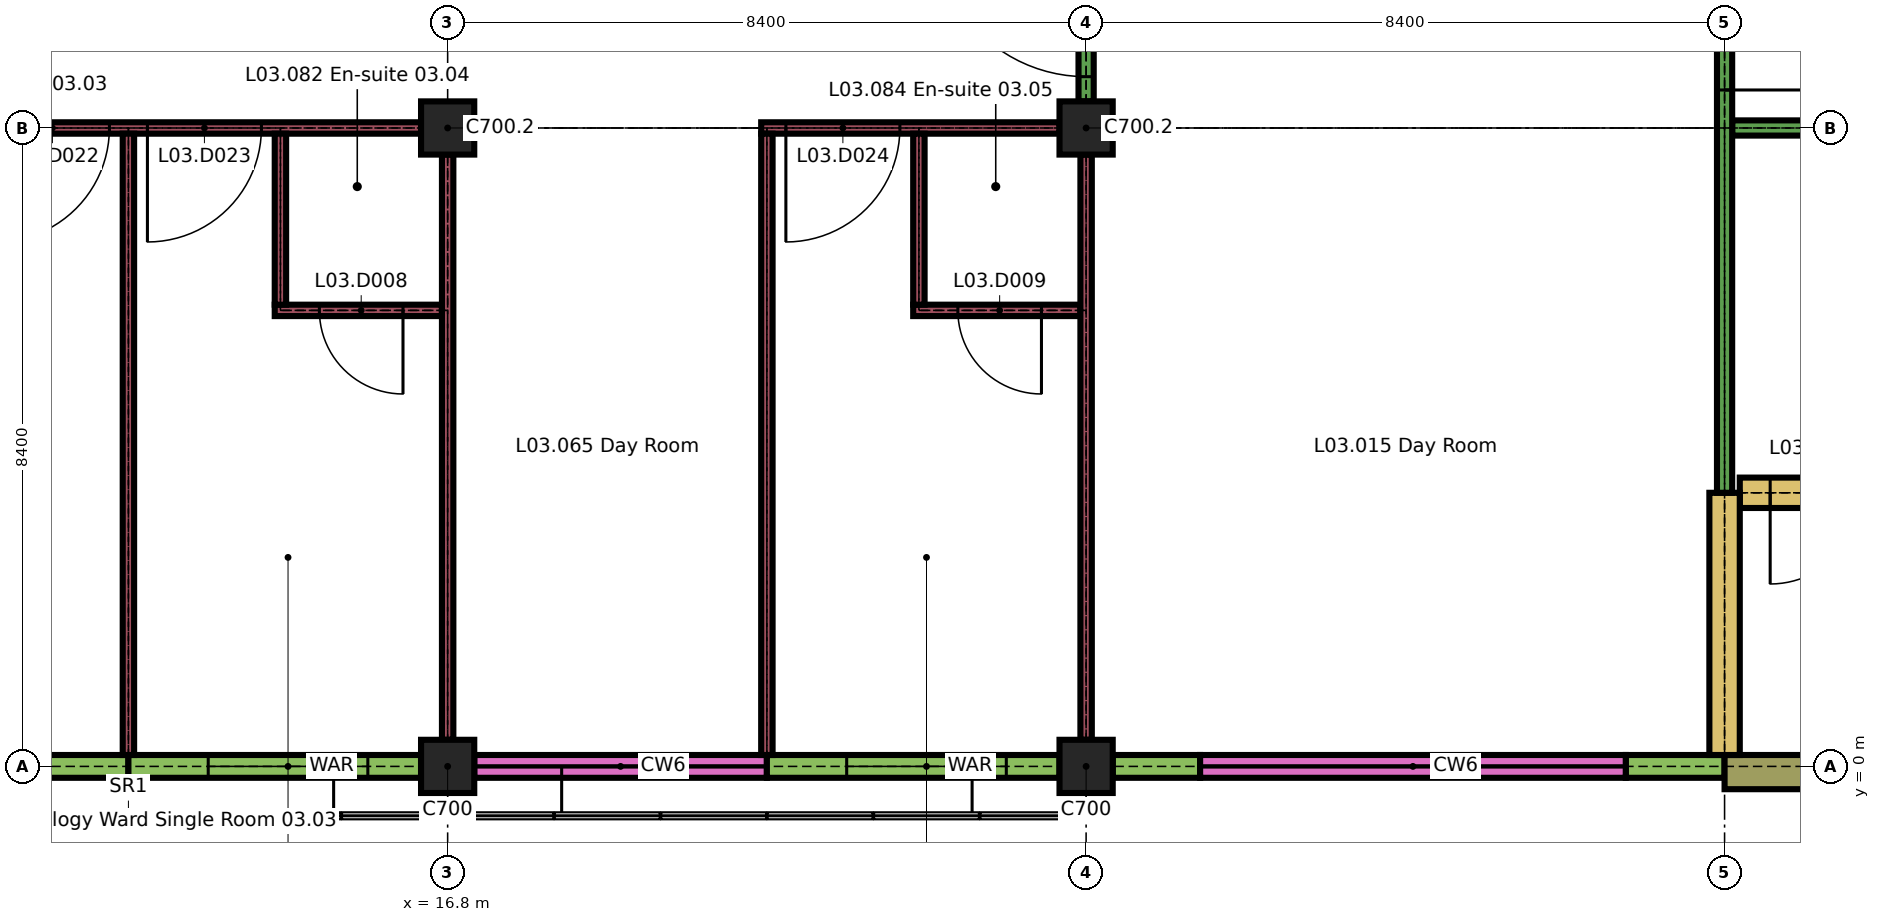
"""IFC4 building model, lengths in metres.
Left out: names, types, materials, properties, quantities, classifications, styles, units other than length and angle.
Written with IfcOpenShell. Run it as: python <this file> out.ifc"""

import sys

from ifc_helpers import new_model, si_unit, direction, frame, frame_2d, origin, origin_2d, place, context, subcontext, project, spatial, rectangle, extrude, element, fill, save


model = new_model("IFC4")
c1 = context("Model", 3, precision=1e-05, world=origin(), true_north=direction((0.0, 1.0)))
c2 = subcontext(c1, "Body", "Model", "MODEL_VIEW")
j1 = project(units=[si_unit("LENGTHUNIT", "METRE"), si_unit("PLANEANGLEUNIT", "RADIAN")], contexts=[c1])
p1 = place(None, origin())
s1 = spatial("IfcSite", under=j1, at=p1, CompositionType="ELEMENT")
p2 = place(p1, origin())
s2 = spatial("IfcBuilding", under=s1, at=p2, CompositionType="ELEMENT")
p3 = place(p2, frame((0.0, 0.0, 15.3)))
s3 = spatial("IfcBuildingStorey", under=s2, at=p3, CompositionType="ELEMENT", Elevation=15.3)
for number, where, z_axis, x_axis in (
    (1, (16.8, 0.0, 0.0), (0.0, 0.0, 1.0), (1.0, 0.0, 0.0)),
    (2, (25.2, 0.0, 0.0), (0.0, 0.0, 1.0), (1.0, 0.0, 0.0)),
    (3, (16.8, 8.4, 0.0), (0.0, 0.0, 1.0), (1.0, 0.0, 0.0)),
    (4, (25.2, 8.4, 0.0), (0.0, 0.0, 1.0), (1.0, 0.0, 0.0)),
):
    element("IfcColumn", number, at=place(p3, frame(where, z_axis=z_axis, x_axis=x_axis)), inside=s3, PredefinedType="COLUMN", context=c2, shape_type="SweptSolid", body=[
        extrude(rectangle(XDim=0.7, YDim=0.7, at=origin_2d()), origin(), (0.0, 0.0, 1.0), 3.26),
    ])
p4 = place(p3, frame((8.75, 0.0, 0.0), z_axis=(0.0, 0.0, 1.0), x_axis=(1.0, 0.0, 0.0)))
e5 = element("IfcWall", 5, at=p4, inside=s3, PredefinedType="SOLIDWALL", context=c2, shape_type="SweptSolid", body=[
    extrude(rectangle(XDim=3.85, YDim=0.3, at=frame_2d((1.925, 0.0))), origin(), (0.0, 0.0, 1.0), 2.96),
])
p5 = place(p4, frame((0.7, 0.0, 0.9)))
e6 = element("IfcOpeningElement", 6, at=p5, cuts=e5, PredefinedType="OPENING", context=c2, shape_type="SweptSolid", body=[
    extrude(rectangle(XDim=2.1, YDim=1.5, at=frame_2d((1.05, 0.75))), frame((0.0, 0.16, 0.0), z_axis=(0.0, -1.0, 0.0), x_axis=(1.0, 0.0, 0.0)), (0.0, 0.0, 1.0), 0.32),
])
p6 = place(p3, frame((12.6, 0.0, 0.0), z_axis=(0.0, 0.0, 1.0), x_axis=(1.0, 0.0, 0.0)))
e7 = element("IfcWall", 7, at=p6, inside=s3, PredefinedType="SOLIDWALL", context=c2, shape_type="SweptSolid", body=[
    extrude(rectangle(XDim=3.85, YDim=0.3, at=frame_2d((1.925, 0.0))), origin(), (0.0, 0.0, 1.0), 2.96),
])
p7 = place(p6, frame((1.05, 0.0, 0.9)))
e8 = element("IfcOpeningElement", 8, at=p7, cuts=e7, PredefinedType="OPENING", context=c2, shape_type="SweptSolid", body=[
    extrude(rectangle(XDim=2.1, YDim=1.5, at=frame_2d((1.05, 0.75))), frame((0.0, 0.16, 0.0), z_axis=(0.0, -1.0, 0.0), x_axis=(1.0, 0.0, 0.0)), (0.0, 0.0, 1.0), 0.32),
])
p8 = place(p3, frame((17.15, 0.0, 0.0), z_axis=(0.0, 0.0, 1.0), x_axis=(1.0, 0.0, 0.0)))
e9 = element("IfcWall", 9, at=p8, inside=s3, PredefinedType="SOLIDWALL", context=c2, shape_type="SweptSolid", body=[
    extrude(rectangle(XDim=3.85, YDim=0.3, at=frame_2d((1.925, 0.0))), origin(), (0.0, 0.0, 1.0), 0.6),
])
p9 = place(p3, frame((21.0, 0.0, 0.0), z_axis=(0.0, 0.0, 1.0), x_axis=(1.0, 0.0, 0.0)))
e10 = element("IfcWall", 10, at=p9, inside=s3, PredefinedType="SOLIDWALL", context=c2, shape_type="SweptSolid", body=[
    extrude(rectangle(XDim=3.85, YDim=0.3, at=frame_2d((1.925, 0.0))), origin(), (0.0, 0.0, 1.0), 2.96),
])
p10 = place(p9, frame((1.05, 0.0, 0.9)))
e11 = element("IfcOpeningElement", 11, at=p10, cuts=e10, PredefinedType="OPENING", context=c2, shape_type="SweptSolid", body=[
    extrude(rectangle(XDim=2.1, YDim=1.5, at=frame_2d((1.05, 0.75))), frame((0.0, 0.16, 0.0), z_axis=(0.0, -1.0, 0.0), x_axis=(1.0, 0.0, 0.0)), (0.0, 0.0, 1.0), 0.32),
])
p11 = place(p3, frame((25.55, 0.0, 0.0), z_axis=(0.0, 0.0, 1.0), x_axis=(1.0, 0.0, 0.0)))
e12 = element("IfcWall", 12, at=p11, inside=s3, PredefinedType="SOLIDWALL", context=c2, shape_type="SweptSolid", body=[
    extrude(rectangle(XDim=1.15, YDim=0.3, at=frame_2d((0.575, 0.0))), origin(), (0.0, 0.0, 1.0), 2.96),
])
p12 = place(p3, frame((32.3, 0.0, 0.0), z_axis=(0.0, 0.0, 1.0), x_axis=(1.0, 0.0, 0.0)))
e13 = element("IfcWall", 13, at=p12, inside=s3, PredefinedType="SOLIDWALL", context=c2, shape_type="SweptSolid", body=[
    extrude(rectangle(XDim=1.3, YDim=0.3, at=frame_2d((0.65, 0.0))), origin(), (0.0, 0.0, 1.0), 2.96),
])
p13 = place(p3, frame((26.7, 0.0, 0.0), z_axis=(0.0, 0.0, 1.0), x_axis=(1.0, 0.0, 0.0)))
e14 = element("IfcWall", 14, at=p13, inside=s3, PredefinedType="SOLIDWALL", context=c2, shape_type="SweptSolid", body=[
    extrude(rectangle(XDim=5.6, YDim=0.3, at=frame_2d((2.8, 0.0))), origin(), (0.0, 0.0, 1.0), 0.6),
])
p14 = place(p3, frame((33.6, -0.075, 0.0), z_axis=(0.0, 0.0, 1.0), x_axis=(1.0, 0.0, 0.0)))
e15 = element("IfcWall", 15, at=p14, inside=s3, PredefinedType="SOLIDWALL", context=c2, shape_type="SweptSolid", body=[
    extrude(rectangle(XDim=3.15, YDim=0.45, at=frame_2d((1.575, 0.0))), origin(), (0.0, 0.0, 1.0), 3.26),
])
p15 = place(p3, frame((33.8, 3.6, 0.0), z_axis=(0.0, 0.0, 1.0), x_axis=(1.0, 0.0, 0.0)))
e16 = element("IfcWall", 16, at=p15, inside=s3, PredefinedType="SHEAR", context=c2, shape_type="SweptSolid", body=[
    extrude(rectangle(XDim=8.0, YDim=0.4, at=frame_2d((4.0, 0.0))), origin(), (0.0, 0.0, 1.0), 3.26),
])
p16 = place(p15, frame((0.4, 0.0, 0.0)))
e17 = element("IfcOpeningElement", 17, at=p16, cuts=e16, PredefinedType="OPENING", context=c2, shape_type="SweptSolid", body=[
    extrude(rectangle(XDim=1.2, YDim=2.1, at=frame_2d((0.6, 1.05))), frame((0.0, 0.21, 0.0), z_axis=(0.0, -1.0, 0.0), x_axis=(1.0, 0.0, 0.0)), (0.0, 0.0, 1.0), 0.42),
])
p17 = place(p3, frame((14.525, 6.0, 0.0), z_axis=(0.0, 0.0, 1.0), x_axis=(1.0, 0.0, 0.0)))
e18 = element("IfcWall", 18, at=p17, inside=s3, PredefinedType="PARTITIONING", context=c2, shape_type="SweptSolid", body=[
    extrude(rectangle(XDim=2.2, YDim=0.15, at=frame_2d((1.1, 0.0))), origin(), (0.0, 0.0, 1.0), 3.26),
])
p18 = place(p17, frame((0.587, 0.0, 0.0)))
e19 = element("IfcOpeningElement", 19, at=p18, cuts=e18, PredefinedType="OPENING", context=c2, shape_type="SweptSolid", body=[
    extrude(rectangle(XDim=1.1, YDim=2.1, at=frame_2d((0.55, 1.05))), frame((0.0, 0.085, 0.0), z_axis=(0.0, -1.0, 0.0), x_axis=(1.0, 0.0, 0.0)), (0.0, 0.0, 1.0), 0.17),
])
p19 = place(p3, frame((22.925, 6.0, 0.0), z_axis=(0.0, 0.0, 1.0), x_axis=(1.0, 0.0, 0.0)))
e20 = element("IfcWall", 20, at=p19, inside=s3, PredefinedType="PARTITIONING", context=c2, shape_type="SweptSolid", body=[
    extrude(rectangle(XDim=2.2, YDim=0.15, at=frame_2d((1.1, 0.0))), origin(), (0.0, 0.0, 1.0), 3.26),
])
p20 = place(p19, frame((0.587, 0.0, 0.0)))
e21 = element("IfcOpeningElement", 21, at=p20, cuts=e20, PredefinedType="OPENING", context=c2, shape_type="SweptSolid", body=[
    extrude(rectangle(XDim=1.1, YDim=2.1, at=frame_2d((0.55, 1.05))), frame((0.0, 0.085, 0.0), z_axis=(0.0, -1.0, 0.0), x_axis=(1.0, 0.0, 0.0)), (0.0, 0.0, 1.0), 0.17),
])
p21 = place(p3, frame((8.75, 8.4, 0.0), z_axis=(0.0, 0.0, 1.0), x_axis=(1.0, 0.0, 0.0)))
e22 = element("IfcWall", 22, at=p21, inside=s3, PredefinedType="PARTITIONING", context=c2, shape_type="SweptSolid", body=[
    extrude(rectangle(XDim=7.7, YDim=0.15, at=frame_2d((3.85, 0.0))), origin(), (0.0, 0.0, 1.0), 3.26),
])
p22 = place(p21, frame((2.1, 0.0, 0.0)))
e23 = element("IfcOpeningElement", 23, at=p22, cuts=e22, PredefinedType="OPENING", context=c2, shape_type="SweptSolid", body=[
    extrude(rectangle(XDim=1.5, YDim=2.4, at=frame_2d((0.75, 1.2))), frame((0.0, 0.085, 0.0), z_axis=(0.0, -1.0, 0.0), x_axis=(1.0, 0.0, 0.0)), (0.0, 0.0, 1.0), 0.17),
])
p23 = place(p21, frame((4.1, 0.0, 0.0)))
e24 = element("IfcOpeningElement", 24, at=p23, cuts=e22, PredefinedType="OPENING", context=c2, shape_type="SweptSolid", body=[
    extrude(rectangle(XDim=1.5, YDim=2.4, at=frame_2d((0.75, 1.2))), frame((0.0, 0.085, 0.0), z_axis=(0.0, -1.0, 0.0), x_axis=(1.0, 0.0, 0.0)), (0.0, 0.0, 1.0), 0.17),
])
p24 = place(p3, frame((20.925, 8.4, 0.0), z_axis=(0.0, 0.0, 1.0), x_axis=(1.0, 0.0, 0.0)))
e25 = element("IfcWall", 25, at=p24, inside=s3, PredefinedType="PARTITIONING", context=c2, shape_type="SweptSolid", body=[
    extrude(rectangle(XDim=3.925, YDim=0.15, at=frame_2d((1.962, 0.0))), origin(), (0.0, 0.0, 1.0), 3.26),
])
p25 = place(p24, frame((0.325, 0.0, 0.0)))
e26 = element("IfcOpeningElement", 26, at=p25, cuts=e25, PredefinedType="OPENING", context=c2, shape_type="SweptSolid", body=[
    extrude(rectangle(XDim=1.5, YDim=2.4, at=frame_2d((0.75, 1.2))), frame((0.0, 0.085, 0.0), z_axis=(0.0, -1.0, 0.0), x_axis=(1.0, 0.0, 0.0)), (0.0, 0.0, 1.0), 0.17),
])
p26 = place(p3, frame((33.7, 8.4, 0.0), z_axis=(0.0, 0.0, 1.0), x_axis=(1.0, 0.0, 0.0)))
e27 = element("IfcWall", 27, at=p26, inside=s3, PredefinedType="PARTITIONING", context=c2, shape_type="SweptSolid", body=[
    extrude(rectangle(XDim=8.2, YDim=0.2, at=frame_2d((4.1, 0.0))), origin(), (0.0, 0.0, 1.0), 3.26),
])
p27 = place(p26, frame((3.1, 0.0, 0.0)))
e28 = element("IfcOpeningElement", 28, at=p27, cuts=e27, PredefinedType="OPENING", context=c2, shape_type="SweptSolid", body=[
    extrude(rectangle(XDim=2.0, YDim=2.4, at=frame_2d((1.0, 1.2))), frame((0.0, 0.11, 0.0), z_axis=(0.0, -1.0, 0.0), x_axis=(1.0, 0.0, 0.0)), (0.0, 0.0, 1.0), 0.22),
])
p28 = place(p3, frame((12.6, 0.15, 0.0), z_axis=(0.0, 0.0, 1.0), x_axis=(0.0, 1.0, 0.0)))
e29 = element("IfcWall", 29, at=p28, inside=s3, PredefinedType="PARTITIONING", context=c2, shape_type="SweptSolid", body=[
    extrude(rectangle(XDim=8.175, YDim=0.15, at=frame_2d((4.087, 0.0))), origin(), (0.0, 0.0, 1.0), 3.26),
])
p29 = place(p3, frame((14.6, 6.075, 0.0), z_axis=(0.0, 0.0, 1.0), x_axis=(0.0, 1.0, 0.0)))
e30 = element("IfcWall", 30, at=p29, inside=s3, PredefinedType="PARTITIONING", context=c2, shape_type="SweptSolid", body=[
    extrude(rectangle(XDim=2.25, YDim=0.15, at=frame_2d((1.125, 0.0))), origin(), (0.0, 0.0, 1.0), 3.26),
])
p30 = place(p3, frame((16.8, 0.35, 0.0), z_axis=(0.0, 0.0, 1.0), x_axis=(0.0, 1.0, 0.0)))
e31 = element("IfcWall", 31, at=p30, inside=s3, PredefinedType="PARTITIONING", context=c2, shape_type="SweptSolid", body=[
    extrude(rectangle(XDim=7.7, YDim=0.15, at=frame_2d((3.85, 0.0))), origin(), (0.0, 0.0, 1.0), 3.26),
])
p31 = place(p3, frame((21.0, 0.15, 0.0), z_axis=(0.0, 0.0, 1.0), x_axis=(0.0, 1.0, 0.0)))
e32 = element("IfcWall", 32, at=p31, inside=s3, PredefinedType="PARTITIONING", context=c2, shape_type="SweptSolid", body=[
    extrude(rectangle(XDim=8.175, YDim=0.15, at=frame_2d((4.087, 0.0))), origin(), (0.0, 0.0, 1.0), 3.26),
])
p32 = place(p3, frame((23.0, 6.075, 0.0), z_axis=(0.0, 0.0, 1.0), x_axis=(0.0, 1.0, 0.0)))
e33 = element("IfcWall", 33, at=p32, inside=s3, PredefinedType="PARTITIONING", context=c2, shape_type="SweptSolid", body=[
    extrude(rectangle(XDim=2.25, YDim=0.15, at=frame_2d((1.125, 0.0))), origin(), (0.0, 0.0, 1.0), 3.26),
])
p33 = place(p3, frame((25.2, 0.35, 0.0), z_axis=(0.0, 0.0, 1.0), x_axis=(0.0, 1.0, 0.0)))
e34 = element("IfcWall", 34, at=p33, inside=s3, PredefinedType="PARTITIONING", context=c2, shape_type="SweptSolid", body=[
    extrude(rectangle(XDim=7.7, YDim=0.15, at=frame_2d((3.85, 0.0))), origin(), (0.0, 0.0, 1.0), 3.26),
])
p34 = place(p3, frame((25.2, 8.75, 0.0), z_axis=(0.0, 0.0, 1.0), x_axis=(0.0, 1.0, 0.0)))
e35 = element("IfcWall", 35, at=p34, inside=s3, PredefinedType="PARTITIONING", context=c2, shape_type="SweptSolid", body=[
    extrude(rectangle(XDim=12.85, YDim=0.2, at=frame_2d((6.425, 0.0))), origin(), (0.0, 0.0, 1.0), 3.26),
])
p35 = place(p34, frame((0.325, 0.0, 0.0)))
e36 = element("IfcOpeningElement", 36, at=p35, cuts=e35, PredefinedType="OPENING", context=c2, shape_type="SweptSolid", body=[
    extrude(rectangle(XDim=2.0, YDim=2.4, at=frame_2d((1.0, 1.2))), frame((0.0, 0.11, 0.0), z_axis=(0.0, -1.0, 0.0), x_axis=(1.0, 0.0, 0.0)), (0.0, 0.0, 1.0), 0.22),
])
p36 = place(p34, frame((5.55, 0.0, 0.0)))
e37 = element("IfcOpeningElement", 37, at=p36, cuts=e35, PredefinedType="OPENING", context=c2, shape_type="SweptSolid", body=[
    extrude(rectangle(XDim=2.0, YDim=2.4, at=frame_2d((1.0, 1.2))), frame((0.0, 0.11, 0.0), z_axis=(0.0, -1.0, 0.0), x_axis=(1.0, 0.0, 0.0)), (0.0, 0.0, 1.0), 0.22),
])
p37 = place(p3, frame((33.6, 0.15, 0.0), z_axis=(0.0, 0.0, 1.0), x_axis=(0.0, 1.0, 0.0)))
e38 = element("IfcWall", 38, at=p37, inside=s3, PredefinedType="SHEAR", context=c2, shape_type="SweptSolid", body=[
    extrude(rectangle(XDim=3.45, YDim=0.4, at=frame_2d((1.725, 0.0))), origin(), (0.0, 0.0, 1.0), 3.26),
])
p38 = place(p3, frame((33.6, 3.6, 0.0), z_axis=(0.0, 0.0, 1.0), x_axis=(0.0, 1.0, 0.0)))
e39 = element("IfcWall", 39, at=p38, inside=s3, PredefinedType="PARTITIONING", context=c2, shape_type="SweptSolid", body=[
    extrude(rectangle(XDim=12.85, YDim=0.2, at=frame_2d((6.425, 0.0))), origin(), (0.0, 0.0, 1.0), 3.26),
])
p39 = place(p38, frame((5.3, 0.0, 0.0)))
e40 = element("IfcOpeningElement", 40, at=p39, cuts=e39, PredefinedType="OPENING", context=c2, shape_type="SweptSolid", body=[
    extrude(rectangle(XDim=2.0, YDim=2.4, at=frame_2d((1.0, 1.2))), frame((0.0, 0.11, 0.0), z_axis=(0.0, -1.0, 0.0), x_axis=(1.0, 0.0, 0.0)), (0.0, 0.0, 1.0), 0.22),
])
p40 = place(p38, frame((10.525, 0.0, 0.0)))
e41 = element("IfcOpeningElement", 41, at=p40, cuts=e39, PredefinedType="OPENING", context=c2, shape_type="SweptSolid", body=[
    extrude(rectangle(XDim=2.0, YDim=2.4, at=frame_2d((1.0, 1.2))), frame((0.0, 0.11, 0.0), z_axis=(0.0, -1.0, 0.0), x_axis=(1.0, 0.0, 0.0)), (0.0, 0.0, 1.0), 0.22),
])
p41 = place(p7, origin())
e42 = element("IfcWindow", 42, at=p41, inside=s3, PartitioningType="DOUBLE_PANEL_VERTICAL", PredefinedType="WINDOW", context=c2, shape_type="SweptSolid", body=[
    extrude(rectangle(XDim=2.1, YDim=1.5, at=frame_2d((1.05, 0.75))), frame((0.0, 0.05, 0.0), z_axis=(0.0, -1.0, 0.0), x_axis=(1.0, 0.0, 0.0)), (0.0, 0.0, 1.0), 0.1),
])
fill(e8, e42)
p42 = place(p10, origin())
e43 = element("IfcWindow", 43, at=p42, inside=s3, PartitioningType="DOUBLE_PANEL_VERTICAL", PredefinedType="WINDOW", context=c2, shape_type="SweptSolid", body=[
    extrude(rectangle(XDim=2.1, YDim=1.5, at=frame_2d((1.05, 0.75))), frame((0.0, 0.05, 0.0), z_axis=(0.0, -1.0, 0.0), x_axis=(1.0, 0.0, 0.0)), (0.0, 0.0, 1.0), 0.1),
])
fill(e11, e43)
p43 = place(p16, origin())
e44 = element("IfcDoor", 44, at=p43, inside=s3, OperationType="SINGLE_SWING_LEFT", PredefinedType="DOOR", context=c2, shape_type="SweptSolid", body=[
    extrude(rectangle(XDim=1.2, YDim=2.1, at=frame_2d((0.6, 1.05))), frame((0.0, 0.025, 0.0), z_axis=(0.0, -1.0, 0.0), x_axis=(1.0, 0.0, 0.0)), (0.0, 0.0, 1.0), 0.05),
])
fill(e17, e44)
p44 = place(p18, origin())
e45 = element("IfcDoor", 45, at=p44, inside=s3, OperationType="SINGLE_SWING_RIGHT", PredefinedType="DOOR", context=c2, shape_type="SweptSolid", body=[
    extrude(rectangle(XDim=1.1, YDim=2.1, at=frame_2d((0.55, 1.05))), frame((0.0, 0.025, 0.0), z_axis=(0.0, -1.0, 0.0), x_axis=(1.0, 0.0, 0.0)), (0.0, 0.0, 1.0), 0.05),
])
fill(e19, e45)
p45 = place(p20, origin())
e46 = element("IfcDoor", 46, at=p45, inside=s3, OperationType="SINGLE_SWING_RIGHT", PredefinedType="DOOR", context=c2, shape_type="SweptSolid", body=[
    extrude(rectangle(XDim=1.1, YDim=2.1, at=frame_2d((0.55, 1.05))), frame((0.0, 0.025, 0.0), z_axis=(0.0, -1.0, 0.0), x_axis=(1.0, 0.0, 0.0)), (0.0, 0.0, 1.0), 0.05),
])
fill(e21, e46)
p46 = place(p22, origin())
e47 = element("IfcDoor", 47, at=p46, inside=s3, OperationType="SINGLE_SWING_LEFT", PredefinedType="DOOR", context=c2, shape_type="SweptSolid", body=[
    extrude(rectangle(XDim=1.5, YDim=2.4, at=frame_2d((0.75, 1.2))), frame((0.0, 0.03, 0.0), z_axis=(0.0, -1.0, 0.0), x_axis=(1.0, 0.0, 0.0)), (0.0, 0.0, 1.0), 0.06),
])
fill(e23, e47)
p47 = place(p23, origin())
e48 = element("IfcDoor", 48, at=p47, inside=s3, OperationType="SINGLE_SWING_LEFT", PredefinedType="DOOR", context=c2, shape_type="SweptSolid", body=[
    extrude(rectangle(XDim=1.5, YDim=2.4, at=frame_2d((0.75, 1.2))), frame((0.0, 0.03, 0.0), z_axis=(0.0, -1.0, 0.0), x_axis=(1.0, 0.0, 0.0)), (0.0, 0.0, 1.0), 0.06),
])
fill(e24, e48)
p48 = place(p25, origin())
e49 = element("IfcDoor", 49, at=p48, inside=s3, OperationType="SINGLE_SWING_LEFT", PredefinedType="DOOR", context=c2, shape_type="SweptSolid", body=[
    extrude(rectangle(XDim=1.5, YDim=2.4, at=frame_2d((0.75, 1.2))), frame((0.0, 0.03, 0.0), z_axis=(0.0, -1.0, 0.0), x_axis=(1.0, 0.0, 0.0)), (0.0, 0.0, 1.0), 0.06),
])
fill(e26, e49)
p49 = place(p35, origin())
e50 = element("IfcDoor", 50, at=p49, inside=s3, OperationType="SINGLE_SWING_LEFT", PredefinedType="DOOR", context=c2, shape_type="SweptSolid", body=[
    extrude(rectangle(XDim=2.0, YDim=2.4, at=frame_2d((1.0, 1.2))), frame((0.0, 0.03, 0.0), z_axis=(0.0, -1.0, 0.0), x_axis=(1.0, 0.0, 0.0)), (0.0, 0.0, 1.0), 0.06),
])
fill(e36, e50)
p50 = place(p39, origin())
e51 = element("IfcDoor", 51, at=p50, inside=s3, OperationType="SINGLE_SWING_LEFT", PredefinedType="DOOR", context=c2, shape_type="SweptSolid", body=[
    extrude(rectangle(XDim=2.0, YDim=2.4, at=frame_2d((1.0, 1.2))), frame((0.0, 0.03, 0.0), z_axis=(0.0, -1.0, 0.0), x_axis=(1.0, 0.0, 0.0)), (0.0, 0.0, 1.0), 0.06),
])
fill(e40, e51)
save(model, sys.argv[1])
